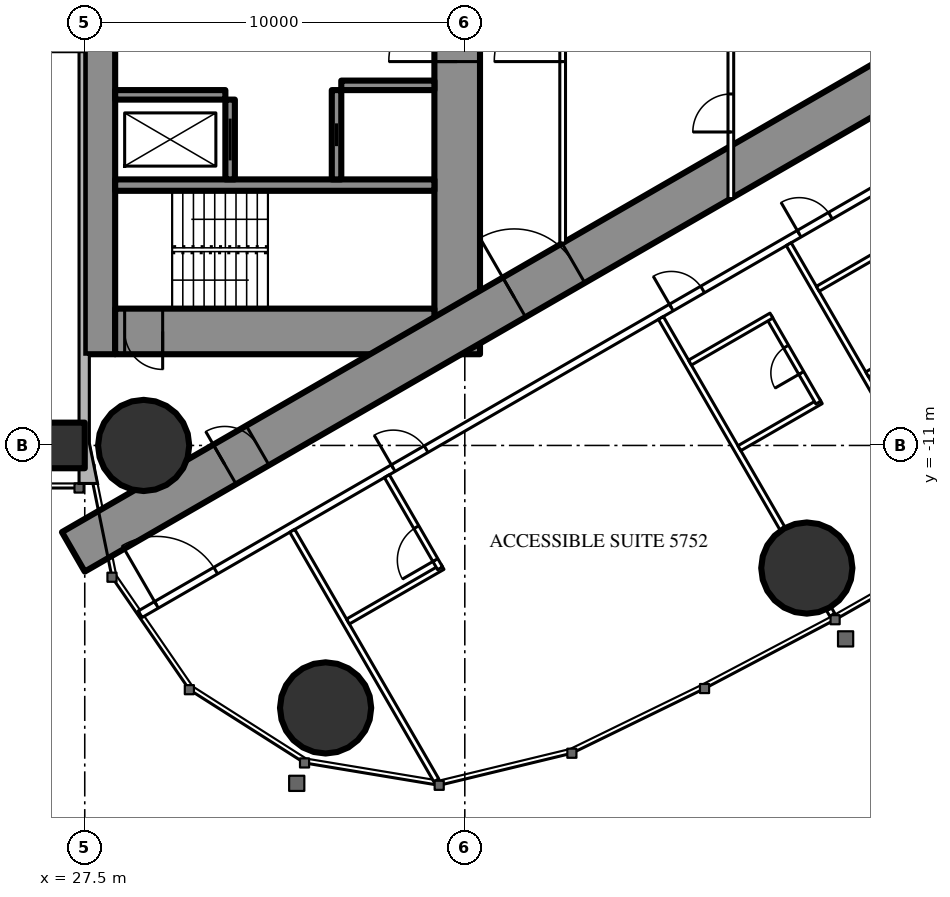
"""IFC4 building model, lengths in metres.
Left out: names, types, materials, properties, quantities, classifications, styles, units other than length and angle.
Written with IfcOpenShell. Run it as: python <this file> out.ifc"""

import sys

from ifc_helpers import new_model, si_unit, direction, frame, frame_2d, origin, origin_2d, place, context, subcontext, project, spatial, rectangle, hollow_rectangle, circle, extrude, element, fill, save


model = new_model("IFC4")
c1 = context("Model", 3, precision=1e-05, world=origin(), true_north=direction((0.0, 1.0)))
c2 = subcontext(c1, "Body", "Model", "MODEL_VIEW")
j1 = project(units=[si_unit("LENGTHUNIT", "METRE"), si_unit("PLANEANGLEUNIT", "RADIAN")], contexts=[c1])
p1 = place(None, origin())
s1 = spatial("IfcSite", under=j1, at=p1, CompositionType="ELEMENT")
p2 = place(p1, origin())
s2 = spatial("IfcBuilding", under=s1, at=p2, CompositionType="ELEMENT")
p3 = place(p2, frame((0.0, 0.0, 215.3)))
s3 = spatial("IfcBuildingStorey", under=s2, at=p3, CompositionType="ELEMENT", Elevation=215.3)
for number, where, z_axis, x_axis in (
    (1, (33.837, -17.906, 0.0), (0.0, 0.0, 1.0), (1.0, 0.0, 0.0)),
    (2, (29.05, -11.0, 0.0), (0.0, 0.0, 1.0), (1.0, 0.0, 0.0)),
    (3, (46.499, -14.226, 0.0), (0.0, 0.0, 1.0), (1.0, 0.0, 0.0)),
):
    element("IfcColumn", number, at=place(p3, frame(where, z_axis=z_axis, x_axis=x_axis)), inside=s3, PredefinedType="COLUMN", context=c2, shape_type="SweptSolid", body=[
        extrude(circle(Radius=1.2, at=origin_2d()), origin(), (0.0, 0.0, 1.0), 3.6),
    ])
p4 = place(p3, frame((27.9, -8.6, 0.0), z_axis=(0.0, 0.0, 1.0), x_axis=(0.0, 1.0, 0.0)))
e4 = element("IfcWall", 4, at=p4, inside=s3, PredefinedType="SHEAR", context=c2, shape_type="SweptSolid", body=[
    extrude(rectangle(XDim=17.2, YDim=0.8, at=frame_2d((8.6, 0.0))), origin(), (0.0, 0.0, 1.0), 3.6),
])
p5 = place(p4, frame((9.35, 0.0, 0.0)))
e5 = element("IfcOpeningElement", 5, at=p5, cuts=e4, PredefinedType="OPENING", context=c2, shape_type="SweptSolid", body=[
    extrude(rectangle(XDim=0.9, YDim=2.2, at=frame_2d((0.45, 1.1))), frame((0.0, 0.41, 0.0), z_axis=(0.0, -1.0, 0.0), x_axis=(1.0, 0.0, 0.0)), (0.0, 0.0, 1.0), 0.82),
])
p6 = place(p3, frame((37.3, -8.6, 0.0), z_axis=(0.0, 0.0, 1.0), x_axis=(0.0, 1.0, 0.0)))
e6 = element("IfcWall", 6, at=p6, inside=s3, PredefinedType="SHEAR", context=c2, shape_type="SweptSolid", body=[
    extrude(rectangle(XDim=17.2, YDim=1.2, at=frame_2d((8.6, 0.0))), origin(), (0.0, 0.0, 1.0), 3.6),
])
p7 = place(p6, frame((7.7, 0.0, 0.0)))
e7 = element("IfcOpeningElement", 7, at=p7, cuts=e6, PredefinedType="OPENING", context=c2, shape_type="SweptSolid", body=[
    extrude(rectangle(XDim=1.8, YDim=2.2, at=frame_2d((0.9, 1.1))), frame((0.0, 0.61, 0.0), z_axis=(0.0, -1.0, 0.0), x_axis=(1.0, 0.0, 0.0)), (0.0, 0.0, 1.0), 1.22),
])
p8 = place(p3, frame((28.3, -8.0, 0.0), z_axis=(0.0, 0.0, 1.0), x_axis=(1.0, 0.0, 0.0)))
e8 = element("IfcWall", 8, at=p8, inside=s3, PredefinedType="SHEAR", context=c2, shape_type="SweptSolid", body=[
    extrude(rectangle(XDim=8.4, YDim=1.2, at=frame_2d((4.2, 0.0))), origin(), (0.0, 0.0, 1.0), 3.6),
])
p9 = place(p8, frame((0.25, 0.0, 0.0)))
e9 = element("IfcOpeningElement", 9, at=p9, cuts=e8, PredefinedType="OPENING", context=c2, shape_type="SweptSolid", body=[
    extrude(rectangle(XDim=1.0, YDim=2.2, at=frame_2d((0.5, 1.1))), frame((0.0, 0.61, 0.0), z_axis=(0.0, -1.0, 0.0), x_axis=(1.0, 0.0, 0.0)), (0.0, 0.0, 1.0), 1.22),
])
p10 = place(p3, frame((28.3, -4.15, 0.0), z_axis=(0.0, 0.0, 1.0), x_axis=(1.0, 0.0, 0.0)))
e10 = element("IfcWall", 10, at=p10, inside=s3, PredefinedType="SHEAR", context=c2, shape_type="SweptSolid", body=[
    extrude(rectangle(XDim=8.4, YDim=0.3, at=frame_2d((4.2, 0.0))), origin(), (0.0, 0.0, 1.0), 3.6),
])
p11 = place(p3, frame((31.325, -4.0, 0.0), z_axis=(0.0, 0.0, 1.0), x_axis=(0.0, 1.0, 0.0)))
e11 = element("IfcWall", 11, at=p11, inside=s3, PredefinedType="SHEAR", context=c2, shape_type="SweptSolid", body=[
    extrude(rectangle(XDim=2.1, YDim=0.25, at=frame_2d((1.05, 0.0))), origin(), (0.0, 0.0, 1.0), 3.6),
])
p12 = place(p11, frame((0.5, 0.0, 0.0)))
e12 = element("IfcOpeningElement", 12, at=p12, cuts=e11, PredefinedType="OPENING", context=c2, shape_type="SweptSolid", body=[
    extrude(rectangle(XDim=1.1, YDim=2.2, at=frame_2d((0.55, 1.1))), frame((0.0, 0.135, 0.0), z_axis=(0.0, -1.0, 0.0), x_axis=(1.0, 0.0, 0.0)), (0.0, 0.0, 1.0), 0.27),
])
p13 = place(p3, frame((34.125, -4.0, 0.0), z_axis=(0.0, 0.0, 1.0), x_axis=(0.0, 1.0, 0.0)))
e13 = element("IfcWall", 13, at=p13, inside=s3, PredefinedType="SHEAR", context=c2, shape_type="SweptSolid", body=[
    extrude(rectangle(XDim=2.35, YDim=0.25, at=frame_2d((1.175, 0.0))), origin(), (0.0, 0.0, 1.0), 3.6),
])
p14 = place(p13, frame((0.875, 0.0, 0.0)))
e14 = element("IfcOpeningElement", 14, at=p14, cuts=e13, PredefinedType="OPENING", context=c2, shape_type="SweptSolid", body=[
    extrude(rectangle(XDim=0.6, YDim=2.0, at=frame_2d((0.3, 1.0))), frame((0.0, 0.135, 0.0), z_axis=(0.0, -1.0, 0.0), x_axis=(1.0, 0.0, 0.0)), (0.0, 0.0, 1.0), 0.27),
])
p15 = place(p3, frame((28.3, -1.775, 0.0), z_axis=(0.0, 0.0, 1.0), x_axis=(1.0, 0.0, 0.0)))
e15 = element("IfcWall", 15, at=p15, inside=s3, PredefinedType="SHEAR", context=c2, shape_type="SweptSolid", body=[
    extrude(rectangle(XDim=2.9, YDim=0.25, at=frame_2d((1.45, 0.0))), origin(), (0.0, 0.0, 1.0), 3.6),
])
p16 = place(p3, frame((34.25, -1.525, 0.0), z_axis=(0.0, 0.0, 1.0), x_axis=(1.0, 0.0, 0.0)))
e16 = element("IfcWall", 16, at=p16, inside=s3, PredefinedType="SHEAR", context=c2, shape_type="SweptSolid", body=[
    extrude(rectangle(XDim=2.45, YDim=0.25, at=frame_2d((1.225, 0.0))), origin(), (0.0, 0.0, 1.0), 3.6),
])
p17 = place(p3, frame((27.2, -13.8, 0.0), z_axis=(0.0, 0.0, 1.0), x_axis=(0.866027159892, 0.499996958321, 0.0)))
e17 = element("IfcWall", 17, at=p17, inside=s3, PredefinedType="SHEAR", context=c2, shape_type="SweptSolid", body=[
    extrude(rectangle(XDim=27.947, YDim=1.2, at=frame_2d((13.973, 0.0))), origin(), (0.0, 0.0, 1.0), 3.6),
])
p18 = place(p17, frame((4.6, 0.0, 0.0)))
e18 = element("IfcOpeningElement", 18, at=p18, cuts=e17, PredefinedType="OPENING", context=c2, shape_type="SweptSolid", body=[
    extrude(rectangle(XDim=1.0, YDim=2.2, at=frame_2d((0.5, 1.1))), frame((0.0, 0.61, 0.0), z_axis=(0.0, -1.0, 0.0), x_axis=(1.0, 0.0, 0.0)), (0.0, 0.0, 1.0), 1.22),
])
p19 = place(p17, frame((13.395, 0.0, 0.0)))
e19 = element("IfcOpeningElement", 19, at=p19, cuts=e17, PredefinedType="OPENING", context=c2, shape_type="SweptSolid", body=[
    extrude(rectangle(XDim=1.8, YDim=2.2, at=frame_2d((0.9, 1.1))), frame((0.0, 0.61, 0.0), z_axis=(0.0, -1.0, 0.0), x_axis=(1.0, 0.0, 0.0)), (0.0, 0.0, 1.0), 1.22),
])
p20 = place(p3, frame((26.9, -11.0, 0.0), z_axis=(0.0, 0.0, 1.0), x_axis=(1.0, 0.0, 0.0)))
e20 = element("IfcColumn", 20, at=p20, inside=s3, PredefinedType="COLUMN", context=c2, shape_type="SweptSolid", body=[
    extrude(hollow_rectangle(XDim=1.2, YDim=1.2, WallThickness=0.12, at=origin_2d()), origin(), (0.0, 0.0, 1.0), 3.6),
])
p21 = place(p3, frame((28.959, -15.44, 0.0), z_axis=(0.0, 0.0, 1.0), x_axis=(0.866025227435, 0.500000305447, 0.0)))
e21 = element("IfcWall", 21, at=p21, inside=s3, PredefinedType="PARTITIONING", context=c2, shape_type="SweptSolid", body=[
    extrude(rectangle(XDim=30.88, YDim=0.2, at=frame_2d((15.44, 0.0))), origin(), (0.0, 0.0, 1.0), 3.35),
])
p22 = place(p21, frame((0.494, 0.0, 0.0)))
e22 = element("IfcOpeningElement", 22, at=p22, cuts=e21, PredefinedType="OPENING", context=c2, shape_type="SweptSolid", body=[
    extrude(rectangle(XDim=1.8, YDim=2.2, at=frame_2d((0.9, 1.1))), frame((0.0, 0.11, 0.0), z_axis=(0.0, -1.0, 0.0), x_axis=(1.0, 0.0, 0.0)), (0.0, 0.0, 1.0), 0.22),
])
p23 = place(p21, frame((7.687, 0.0, 0.0)))
e23 = element("IfcOpeningElement", 23, at=p23, cuts=e21, PredefinedType="OPENING", context=c2, shape_type="SweptSolid", body=[
    extrude(rectangle(XDim=1.0, YDim=2.2, at=frame_2d((0.5, 1.1))), frame((0.0, 0.11, 0.0), z_axis=(0.0, -1.0, 0.0), x_axis=(1.0, 0.0, 0.0)), (0.0, 0.0, 1.0), 0.22),
])
p24 = place(p21, frame((16.137, 0.0, 0.0)))
e24 = element("IfcOpeningElement", 24, at=p24, cuts=e21, PredefinedType="OPENING", context=c2, shape_type="SweptSolid", body=[
    extrude(rectangle(XDim=0.95, YDim=2.2, at=frame_2d((0.475, 1.1))), frame((0.0, 0.11, 0.0), z_axis=(0.0, -1.0, 0.0), x_axis=(1.0, 0.0, 0.0)), (0.0, 0.0, 1.0), 0.22),
])
p25 = place(p21, frame((20.021, 0.0, 0.0)))
e25 = element("IfcOpeningElement", 25, at=p25, cuts=e21, PredefinedType="OPENING", context=c2, shape_type="SweptSolid", body=[
    extrude(rectangle(XDim=0.95, YDim=2.2, at=frame_2d((0.475, 1.1))), frame((0.0, 0.11, 0.0), z_axis=(0.0, -1.0, 0.0), x_axis=(1.0, 0.0, 0.0)), (0.0, 0.0, 1.0), 0.22),
])
p26 = place(p21, frame((26.253, 0.0, 0.0)))
e26 = element("IfcOpeningElement", 26, at=p26, cuts=e21, PredefinedType="OPENING", context=c2, shape_type="SweptSolid", body=[
    extrude(rectangle(XDim=0.95, YDim=2.2, at=frame_2d((0.475, 1.1))), frame((0.0, 0.11, 0.0), z_axis=(0.0, -1.0, 0.0), x_axis=(1.0, 0.0, 0.0)), (0.0, 0.0, 1.0), 0.22),
])
p27 = place(p3, frame((32.96, -13.246, 0.0), z_axis=(0.0, 0.0, 1.0), x_axis=(0.500000236886, -0.866025267018, 0.0)))
e27 = element("IfcWall", 27, at=p27, inside=s3, PredefinedType="PARTITIONING", context=c2, shape_type="SweptSolid", body=[
    extrude(rectangle(XDim=7.583, YDim=0.15, at=frame_2d((3.791, 0.0))), origin(), (0.0, 0.0, 1.0), 3.35),
])
p28 = place(p3, frame((42.66, -7.646, 0.0), z_axis=(0.0, 0.0, 1.0), x_axis=(0.499996592859, -0.866027370889, 0.0)))
e28 = element("IfcWall", 28, at=p28, inside=s3, PredefinedType="PARTITIONING", context=c2, shape_type="SweptSolid", body=[
    extrude(rectangle(XDim=6.398, YDim=0.15, at=frame_2d((3.199, 0.0))), origin(), (0.0, 0.0, 1.0), 2.45),
])
p29 = place(p3, frame((47.079, -15.3, 0.0), z_axis=(0.0, 0.0, 1.0), x_axis=(0.499212083968, -0.866479829667, 0.0)))
e29 = element("IfcWall", 29, at=p29, inside=s3, PredefinedType="PARTITIONING", context=c2, shape_type="SweptSolid", body=[
    extrude(rectangle(XDim=0.179, YDim=0.15, at=frame_2d((0.09, 0.0))), origin(), (0.0, 0.0, 1.0), 2.45),
])
p30 = place(p3, frame((46.023, -5.704, 0.0), z_axis=(0.0, 0.0, 1.0), x_axis=(0.499984478165, -0.866034365135, 0.0)))
e30 = element("IfcWall", 30, at=p30, inside=s3, PredefinedType="PARTITIONING", context=c2, shape_type="SweptSolid", body=[
    extrude(rectangle(XDim=6.426, YDim=0.15, at=frame_2d((3.213, 0.0))), origin(), (0.0, 0.0, 1.0), 2.45),
])
p31 = place(p3, frame((34.425, -15.633, 0.0), z_axis=(0.0, 0.0, 1.0), x_axis=(0.866018712932, 0.500011588718, 0.0)))
e31 = element("IfcWall", 31, at=p31, inside=s3, PredefinedType="PARTITIONING", context=c2, shape_type="SweptSolid", body=[
    extrude(rectangle(XDim=2.875, YDim=0.15, at=frame_2d((1.438, 0.0))), origin(), (0.0, 0.0, 1.0), 3.35),
])
p32 = place(p3, frame((35.45, -11.808, 0.0), z_axis=(0.0, 0.0, 1.0), x_axis=(0.49994636267, -0.866056369097, 0.0)))
e32 = element("IfcWall", 32, at=p32, inside=s3, PredefinedType="PARTITIONING", context=c2, shape_type="SweptSolid", body=[
    extrude(rectangle(XDim=2.8, YDim=0.15, at=frame_2d((1.4, 0.0))), origin(), (0.0, 0.0, 1.0), 3.35),
])
p33 = place(p32, frame((1.55, 0.0, 0.0)))
e33 = element("IfcOpeningElement", 33, at=p33, cuts=e32, PredefinedType="OPENING", context=c2, shape_type="SweptSolid", body=[
    extrude(rectangle(XDim=1.0, YDim=2.2, at=frame_2d((0.5, 1.1))), frame((0.0, 0.085, 0.0), z_axis=(0.0, -1.0, 0.0), x_axis=(1.0, 0.0, 0.0)), (0.0, 0.0, 1.0), 0.17),
])
p34 = place(p3, frame((44.725, -11.072, 0.0), z_axis=(0.0, 0.0, 1.0), x_axis=(0.866006523861, 0.500032699561, 0.0)))
e34 = element("IfcWall", 34, at=p34, inside=s3, PredefinedType="PARTITIONING", context=c2, shape_type="SweptSolid", body=[
    extrude(rectangle(XDim=2.475, YDim=0.15, at=frame_2d((1.237, 0.0))), origin(), (0.0, 0.0, 1.0), 3.35),
])
p35 = place(p3, frame((45.503, -7.621, 0.0), z_axis=(0.0, 0.0, 1.0), x_axis=(0.500006934395, -0.866021400173, 0.0)))
e35 = element("IfcWall", 35, at=p35, inside=s3, PredefinedType="PARTITIONING", context=c2, shape_type="SweptSolid", body=[
    extrude(rectangle(XDim=2.6, YDim=0.15, at=frame_2d((1.3, 0.0))), origin(), (0.0, 0.0, 1.0), 3.35),
])
p36 = place(p35, frame((0.9, 0.0, 0.0)))
e36 = element("IfcOpeningElement", 36, at=p36, cuts=e35, PredefinedType="OPENING", context=c2, shape_type="SweptSolid", body=[
    extrude(rectangle(XDim=0.8, YDim=2.2, at=frame_2d((0.4, 1.1))), frame((0.0, 0.085, 0.0), z_axis=(0.0, -1.0, 0.0), x_axis=(1.0, 0.0, 0.0)), (0.0, 0.0, 1.0), 0.17),
])
for number, where, z_axis, x_axis in (
    (37, (43.425, -8.821, 0.0), (0.0, 0.0, 1.0), (0.866, 0.5, 0.0)),
    (38, (48.088, -9.13, 0.0), (0.0, 0.0, 1.0), (0.866, 0.5, 0.0)),
    (39, (46.788, -6.879, 0.0), (0.0, 0.0, 1.0), (0.866, 0.5, 0.0)),
):
    element("IfcWall", number, at=place(p3, frame(where, z_axis=z_axis, x_axis=x_axis)), inside=s3, PredefinedType="PARTITIONING", context=c2, shape_type="SweptSolid", body=[
        extrude(rectangle(XDim=2.475, YDim=0.15, at=frame_2d((1.237, 0.0))), origin(), (0.0, 0.0, 1.0), 3.35),
    ])
p37 = place(p3, frame((40.075, -5.674, 0.0), z_axis=(0.0, 0.0, 1.0), x_axis=(0.0, 1.0, 0.0)))
e40 = element("IfcWall", 40, at=p37, inside=s3, PredefinedType="PARTITIONING", context=c2, shape_type="SweptSolid", body=[
    extrude(rectangle(XDim=11.348, YDim=0.15, at=frame_2d((5.674, 0.0))), origin(), (0.0, 0.0, 1.0), 3.35),
])
p38 = place(p37, frame((4.774, 0.0, 0.0)))
e41 = element("IfcOpeningElement", 41, at=p38, cuts=e40, PredefinedType="OPENING", context=c2, shape_type="SweptSolid", body=[
    extrude(rectangle(XDim=1.8, YDim=2.2, at=frame_2d((0.9, 1.1))), frame((0.0, 0.085, 0.0), z_axis=(0.0, -1.0, 0.0), x_axis=(1.0, 0.0, 0.0)), (0.0, 0.0, 1.0), 0.17),
])
p39 = place(p3, frame((44.5, -4.505, 0.0), z_axis=(0.0, 0.0, 1.0), x_axis=(0.0, 1.0, 0.0)))
e42 = element("IfcWall", 42, at=p39, inside=s3, PredefinedType="PARTITIONING", context=c2, shape_type="SweptSolid", body=[
    extrude(rectangle(XDim=9.009, YDim=0.15, at=frame_2d((4.505, 0.0))), origin(), (0.0, 0.0, 1.0), 3.35),
])
p40 = place(p39, frame((1.752, 0.0, 0.0)))
e43 = element("IfcOpeningElement", 43, at=p40, cuts=e42, PredefinedType="OPENING", context=c2, shape_type="SweptSolid", body=[
    extrude(rectangle(XDim=1.0, YDim=2.2, at=frame_2d((0.5, 1.1))), frame((0.0, 0.085, 0.0), z_axis=(0.0, -1.0, 0.0), x_axis=(1.0, 0.0, 0.0)), (0.0, 0.0, 1.0), 0.17),
])
p41 = place(p39, frame((6.257, 0.0, 0.0)))
e44 = element("IfcOpeningElement", 44, at=p41, cuts=e42, PredefinedType="OPENING", context=c2, shape_type="SweptSolid", body=[
    extrude(rectangle(XDim=1.0, YDim=2.2, at=frame_2d((0.5, 1.1))), frame((0.0, 0.085, 0.0), z_axis=(0.0, -1.0, 0.0), x_axis=(1.0, 0.0, 0.0)), (0.0, 0.0, 1.0), 0.17),
])
p42 = place(p22, origin())
e45 = element("IfcDoor", 45, at=p42, inside=s3, OperationType="DOUBLE_DOOR_SINGLE_SWING", PredefinedType="DOOR", context=c2, shape_type="SweptSolid", body=[
    extrude(rectangle(XDim=1.8, YDim=2.2, at=frame_2d((0.9, 1.1))), frame((0.0, 0.025, 0.0), z_axis=(0.0, -1.0, 0.0), x_axis=(1.0, 0.0, 0.0)), (0.0, 0.0, 1.0), 0.05),
])
fill(e22, e45)
p43 = place(p33, origin())
e46 = element("IfcDoor", 46, at=p43, inside=s3, OperationType="SINGLE_SWING_RIGHT", PredefinedType="DOOR", context=c2, shape_type="SweptSolid", body=[
    extrude(rectangle(XDim=1.0, YDim=2.2, at=frame_2d((0.5, 1.1))), frame((0.0, 0.025, 0.0), z_axis=(0.0, -1.0, 0.0), x_axis=(1.0, 0.0, 0.0)), (0.0, 0.0, 1.0), 0.05),
])
fill(e33, e46)
p44 = place(p23, origin())
e47 = element("IfcDoor", 47, at=p44, inside=s3, OperationType="SINGLE_SWING_LEFT", PredefinedType="DOOR", context=c2, shape_type="SweptSolid", body=[
    extrude(rectangle(XDim=1.0, YDim=2.2, at=frame_2d((0.5, 1.1))), frame((0.0, 0.025, 0.0), z_axis=(0.0, -1.0, 0.0), x_axis=(1.0, 0.0, 0.0)), (0.0, 0.0, 1.0), 0.05),
])
fill(e23, e47)
p45 = place(p36, origin())
e48 = element("IfcDoor", 48, at=p45, inside=s3, OperationType="SINGLE_SWING_RIGHT", PredefinedType="DOOR", context=c2, shape_type="SweptSolid", body=[
    extrude(rectangle(XDim=0.8, YDim=2.2, at=frame_2d((0.4, 1.1))), frame((0.0, 0.025, 0.0), z_axis=(0.0, -1.0, 0.0), x_axis=(1.0, 0.0, 0.0)), (0.0, 0.0, 1.0), 0.05),
])
fill(e36, e48)
p46 = place(p24, origin())
e49 = element("IfcDoor", 49, at=p46, inside=s3, OperationType="SINGLE_SWING_LEFT", PredefinedType="DOOR", context=c2, shape_type="SweptSolid", body=[
    extrude(rectangle(XDim=0.95, YDim=2.2, at=frame_2d((0.475, 1.1))), frame((0.0, 0.025, 0.0), z_axis=(0.0, -1.0, 0.0), x_axis=(1.0, 0.0, 0.0)), (0.0, 0.0, 1.0), 0.05),
])
fill(e24, e49)
p47 = place(p25, origin())
e50 = element("IfcDoor", 50, at=p47, inside=s3, OperationType="SINGLE_SWING_LEFT", PredefinedType="DOOR", context=c2, shape_type="SweptSolid", body=[
    extrude(rectangle(XDim=0.95, YDim=2.2, at=frame_2d((0.475, 1.1))), frame((0.0, 0.025, 0.0), z_axis=(0.0, -1.0, 0.0), x_axis=(1.0, 0.0, 0.0)), (0.0, 0.0, 1.0), 0.05),
])
fill(e25, e50)
p48 = place(p38, origin())
e51 = element("IfcDoor", 51, at=p48, inside=s3, OperationType="DOUBLE_DOOR_SINGLE_SWING", PredefinedType="DOOR", context=c2, shape_type="SweptSolid", body=[
    extrude(rectangle(XDim=1.8, YDim=2.2, at=frame_2d((0.9, 1.1))), frame((0.0, 0.025, 0.0), z_axis=(0.0, -1.0, 0.0), x_axis=(1.0, 0.0, 0.0)), (0.0, 0.0, 1.0), 0.05),
])
fill(e41, e51)
p49 = place(p40, origin())
e52 = element("IfcDoor", 52, at=p49, inside=s3, OperationType="SINGLE_SWING_LEFT", PredefinedType="DOOR", context=c2, shape_type="SweptSolid", body=[
    extrude(rectangle(XDim=1.0, YDim=2.2, at=frame_2d((0.5, 1.1))), frame((0.0, 0.025, 0.0), z_axis=(0.0, -1.0, 0.0), x_axis=(1.0, 0.0, 0.0)), (0.0, 0.0, 1.0), 0.05),
])
fill(e43, e52)
p50 = place(p18, origin())
e53 = element("IfcDoor", 53, at=p50, inside=s3, OperationType="SINGLE_SWING_LEFT", PredefinedType="DOOR", context=c2, shape_type="SweptSolid", body=[
    extrude(rectangle(XDim=1.0, YDim=2.2, at=frame_2d((0.5, 1.1))), frame((0.0, 0.025, 0.0), z_axis=(0.0, -1.0, 0.0), x_axis=(1.0, 0.0, 0.0)), (0.0, 0.0, 1.0), 0.05),
])
fill(e18, e53)
p51 = place(p19, origin())
e54 = element("IfcDoor", 54, at=p51, inside=s3, OperationType="DOUBLE_DOOR_SINGLE_SWING", PredefinedType="DOOR", context=c2, shape_type="SweptSolid", body=[
    extrude(rectangle(XDim=1.8, YDim=2.2, at=frame_2d((0.9, 1.1))), frame((0.0, 0.025, 0.0), z_axis=(0.0, -1.0, 0.0), x_axis=(1.0, 0.0, 0.0)), (0.0, 0.0, 1.0), 0.05),
])
fill(e19, e54)
p52 = place(p7, origin())
e55 = element("IfcDoor", 55, at=p52, inside=s3, OperationType="DOUBLE_DOOR_SINGLE_SWING", PredefinedType="DOOR", context=c2, shape_type="SweptSolid", body=[
    extrude(rectangle(XDim=1.8, YDim=2.2, at=frame_2d((0.9, 1.1))), frame((0.0, 0.025, 0.0), z_axis=(0.0, -1.0, 0.0), x_axis=(1.0, 0.0, 0.0)), (0.0, 0.0, 1.0), 0.05),
])
fill(e7, e55)
p53 = place(p9, origin())
e56 = element("IfcDoor", 56, at=p53, inside=s3, OperationType="SINGLE_SWING_RIGHT", PredefinedType="DOOR", context=c2, shape_type="SweptSolid", body=[
    extrude(rectangle(XDim=1.0, YDim=2.2, at=frame_2d((0.5, 1.1))), frame((0.0, 0.025, 0.0), z_axis=(0.0, -1.0, 0.0), x_axis=(1.0, 0.0, 0.0)), (0.0, 0.0, 1.0), 0.05),
])
fill(e9, e56)
p54 = place(p12, origin())
e57 = element("IfcDoor", 57, at=p54, inside=s3, OperationType="SLIDING_TO_LEFT", PredefinedType="USERDEFINED", context=c2, shape_type="SweptSolid", body=[
    extrude(rectangle(XDim=1.1, YDim=2.2, at=frame_2d((0.55, 1.1))), frame((0.0, 0.025, 0.0), z_axis=(0.0, -1.0, 0.0), x_axis=(1.0, 0.0, 0.0)), (0.0, 0.0, 1.0), 0.05),
])
fill(e12, e57)
p55 = place(p14, origin())
e58 = element("IfcDoor", 58, at=p55, inside=s3, OperationType="SLIDING_TO_LEFT", PredefinedType="DOOR", context=c2, shape_type="SweptSolid", body=[
    extrude(rectangle(XDim=0.6, YDim=2.0, at=frame_2d((0.3, 1.0))), frame((0.0, 0.025, 0.0), z_axis=(0.0, -1.0, 0.0), x_axis=(1.0, 0.0, 0.0)), (0.0, 0.0, 1.0), 0.05),
])
fill(e14, e58)
save(model, sys.argv[1])
